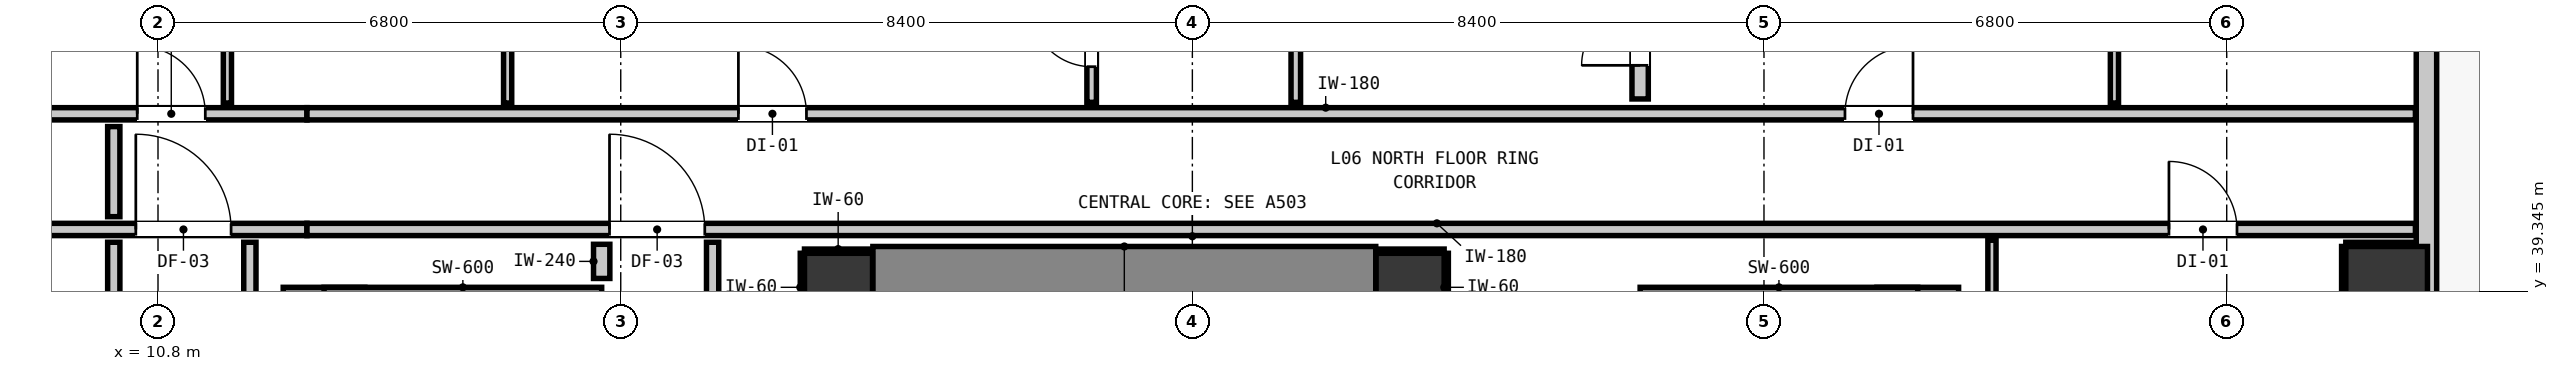
"""IFC4 building model, lengths in metres.
Left out: names, types, materials, properties, quantities, classifications, styles, units other than length and angle.
Written with IfcOpenShell. Run it as: python <this file> out.ifc"""

import sys

from ifc_helpers import new_model, si_unit, direction, frame, frame_2d, origin, origin_2d, place, context, subcontext, project, spatial, rectangle, extrude, element, fill, save


model = new_model("IFC4")
c1 = context("Model", 3, precision=1e-05, world=origin(), true_north=direction((0.0, 1.0)))
c2 = subcontext(c1, "Body", "Model", "MODEL_VIEW")
j1 = project(units=[si_unit("LENGTHUNIT", "METRE"), si_unit("PLANEANGLEUNIT", "RADIAN")], contexts=[c1])
p1 = place(None, origin())
s1 = spatial("IfcSite", under=j1, at=p1, CompositionType="ELEMENT")
p2 = place(p1, origin())
s2 = spatial("IfcBuilding", under=s1, at=p2, CompositionType="ELEMENT")
p3 = place(p2, frame((0.0, 0.0, 25.32)))
s3 = spatial("IfcBuildingStorey", under=s2, at=p3, CompositionType="ELEMENT", Elevation=25.32)
for number, where, z_axis, x_axis in (
    (1, (20.8, 39.4, 0.0), (0.0, 0.0, 1.0), (1.0, 0.0, 0.0)),
    (2, (29.2, 39.4, 0.0), (0.0, 0.0, 1.0), (1.0, 0.0, 0.0)),
):
    element("IfcColumn", number, at=place(p3, frame(where, z_axis=z_axis, x_axis=x_axis)), inside=s3, PredefinedType="COLUMN", context=c2, shape_type="SweptSolid", body=[
        extrude(rectangle(XDim=1.0, YDim=1.0, at=origin_2d()), origin(), (0.0, 0.0, 1.0), 3.32),
    ])
p4 = place(p3, frame((13.24, 31.205, 0.0), z_axis=(0.0, 0.0, 1.0), x_axis=(0.0, 1.0, 0.0)))
e3 = element("IfcWall", 3, at=p4, inside=s3, PredefinedType="SHEAR", context=c2, shape_type="SweptSolid", body=[
    extrude(rectangle(XDim=8.195, YDim=1.2, at=frame_2d((4.097, 0.0))), origin(), (0.0, 0.0, 1.0), 3.32),
])
p5 = place(p3, frame((13.24, 39.1, 0.0), z_axis=(0.0, 0.0, 1.0), x_axis=(1.0, 0.0, 0.0)))
e4 = element("IfcWall", 4, at=p5, inside=s3, PredefinedType="SHEAR", context=c2, shape_type="SweptSolid", body=[
    extrude(rectangle(XDim=4.08, YDim=0.6, at=frame_2d((2.04, 0.0))), origin(), (0.0, 0.0, 1.0), 3.32),
])
p6 = place(p3, frame((36.66, 31.205, 0.0), z_axis=(0.0, 0.0, 1.0), x_axis=(0.0, 1.0, 0.0)))
e5 = element("IfcWall", 5, at=p6, inside=s3, PredefinedType="SHEAR", context=c2, shape_type="SweptSolid", body=[
    extrude(rectangle(XDim=8.195, YDim=1.2, at=frame_2d((4.097, 0.0))), origin(), (0.0, 0.0, 1.0), 3.32),
])
p7 = place(p3, frame((32.58, 39.1, 0.0), z_axis=(0.0, 0.0, 1.0), x_axis=(1.0, 0.0, 0.0)))
e6 = element("IfcWall", 6, at=p7, inside=s3, PredefinedType="SHEAR", context=c2, shape_type="SweptSolid", body=[
    extrude(rectangle(XDim=4.08, YDim=0.6, at=frame_2d((2.04, 0.0))), origin(), (0.0, 0.0, 1.0), 3.32),
])
p8 = place(p3, frame((21.305, 39.4, 0.0), z_axis=(0.0, 0.0, 1.0), x_axis=(1.0, 0.0, 0.0)))
e7 = element("IfcWall", 7, at=p8, inside=s3, PredefinedType="SHEAR", context=c2, shape_type="SweptSolid", body=[
    extrude(rectangle(XDim=7.39, YDim=1.2, at=frame_2d((3.695, 0.0))), origin(), (0.0, 0.0, 1.0), 3.32),
])
p9 = place(p3, frame((43.55, 39.4, 0.0), z_axis=(0.0, 0.0, 1.0), x_axis=(1.0, 0.0, 0.0)))
e8 = element("IfcColumn", 8, at=p9, inside=s3, PredefinedType="COLUMN", context=c2, shape_type="SweptSolid", body=[
    extrude(rectangle(XDim=1.2, YDim=1.2, at=origin_2d()), origin(), (0.0, 0.0, 1.0), 3.32),
])
p10 = place(p3, frame((44.135, 44.835, 0.0), z_axis=(0.0, 0.0, 1.0), x_axis=(0.0, -1.0, 0.0)))
e9 = element("IfcWall", 9, at=p10, inside=s3, PredefinedType="STANDARD", context=c2, shape_type="SweptSolid", body=[
    extrude(rectangle(XDim=34.67, YDim=0.3, at=frame_2d((17.335, 0.0))), origin(), (0.0, 0.0, 1.0), 3.06),
])
p11 = place(p10, frame((0.901, 0.0, 0.0)))
e10 = element("IfcOpeningElement", 10, at=p11, cuts=e9, PredefinedType="OPENING", context=c2, shape_type="SweptSolid", body=[
    extrude(rectangle(XDim=1.0, YDim=2.15, at=frame_2d((0.5, 1.075))), frame((0.0, 0.16, 0.0), z_axis=(0.0, -1.0, 0.0), x_axis=(1.0, 0.0, 0.0)), (0.0, 0.0, 1.0), 0.32),
])
p12 = place(p10, frame((19.91, 0.0, 0.85)))
e11 = element("IfcOpeningElement", 11, at=p12, cuts=e9, PredefinedType="OPENING", context=c2, shape_type="SweptSolid", body=[
    extrude(rectangle(XDim=1.65, YDim=1.75, at=frame_2d((0.825, 0.875))), frame((0.0, 0.16, 0.0), z_axis=(0.0, -1.0, 0.0), x_axis=(1.0, 0.0, 0.0)), (0.0, 0.0, 1.0), 0.32),
])
p13 = place(p10, frame((7.126, 0.0, 0.85)))
e12 = element("IfcOpeningElement", 12, at=p13, cuts=e9, PredefinedType="OPENING", context=c2, shape_type="SweptSolid", body=[
    extrude(rectangle(XDim=1.65, YDim=1.75, at=frame_2d((0.825, 0.875))), frame((0.0, 0.16, 0.0), z_axis=(0.0, -1.0, 0.0), x_axis=(1.0, 0.0, 0.0)), (0.0, 0.0, 1.0), 0.32),
])
p14 = place(p3, frame((2.661, 40.25, 0.0), z_axis=(0.0, 0.0, 1.0), x_axis=(1.0, 0.0, 0.0)))
e13 = element("IfcWall", 13, at=p14, inside=s3, PredefinedType="PARTITIONING", context=c2, shape_type="SweptSolid", body=[
    extrude(rectangle(XDim=10.328, YDim=0.18, at=frame_2d((5.164, 0.0))), origin(), (0.0, 0.0, 1.0), 2.445),
])
p15 = place(p14, frame((7.813, 0.0, 0.0)))
e14 = element("IfcOpeningElement", 14, at=p15, cuts=e13, PredefinedType="OPENING", context=c2, shape_type="SweptSolid", body=[
    extrude(rectangle(XDim=1.4, YDim=2.15, at=frame_2d((0.7, 1.075))), frame((0.0, 0.1, 0.0), z_axis=(0.0, -1.0, 0.0), x_axis=(1.0, 0.0, 0.0)), (0.0, 0.0, 1.0), 0.2),
])
p16 = place(p3, frame((12.989, 40.25, 0.0), z_axis=(0.0, 0.0, 1.0), x_axis=(1.0, 0.0, 0.0)))
e15 = element("IfcWall", 15, at=p16, inside=s3, PredefinedType="PARTITIONING", context=c2, shape_type="SweptSolid", body=[
    extrude(rectangle(XDim=30.984, YDim=0.18, at=frame_2d((15.492, 0.0))), origin(), (0.0, 0.0, 1.0), 3.06),
])
p17 = place(p16, frame((4.446, 0.0, 0.0)))
e16 = element("IfcOpeningElement", 16, at=p17, cuts=e15, PredefinedType="OPENING", context=c2, shape_type="SweptSolid", body=[
    extrude(rectangle(XDim=1.4, YDim=2.15, at=frame_2d((0.7, 1.075))), frame((0.0, 0.1, 0.0), z_axis=(0.0, -1.0, 0.0), x_axis=(1.0, 0.0, 0.0)), (0.0, 0.0, 1.0), 0.2),
])
p18 = place(p16, frame((27.362, 0.0, 0.0)))
e17 = element("IfcOpeningElement", 17, at=p18, cuts=e15, PredefinedType="OPENING", context=c2, shape_type="SweptSolid", body=[
    extrude(rectangle(XDim=1.0, YDim=2.15, at=frame_2d((0.5, 1.075))), frame((0.0, 0.1, 0.0), z_axis=(0.0, -1.0, 0.0), x_axis=(1.0, 0.0, 0.0)), (0.0, 0.0, 1.0), 0.2),
])
p19 = place(p3, frame((2.661, 41.95, 0.0), z_axis=(0.0, 0.0, 1.0), x_axis=(1.0, 0.0, 0.0)))
e18 = element("IfcWall", 18, at=p19, inside=s3, PredefinedType="PARTITIONING", context=c2, shape_type="SweptSolid", body=[
    extrude(rectangle(XDim=10.328, YDim=0.18, at=frame_2d((5.164, 0.0))), origin(), (0.0, 0.0, 1.0), 2.445),
])
p20 = place(p19, frame((7.834, 0.0, 0.0)))
e19 = element("IfcOpeningElement", 19, at=p20, cuts=e18, PredefinedType="OPENING", context=c2, shape_type="SweptSolid", body=[
    extrude(rectangle(XDim=1.0, YDim=2.15, at=frame_2d((0.5, 1.075))), frame((0.0, 0.1, 0.0), z_axis=(0.0, -1.0, 0.0), x_axis=(1.0, 0.0, 0.0)), (0.0, 0.0, 1.0), 0.2),
])
p21 = place(p3, frame((12.989, 41.95, 0.0), z_axis=(0.0, 0.0, 1.0), x_axis=(1.0, 0.0, 0.0)))
e20 = element("IfcWall", 20, at=p21, inside=s3, PredefinedType="PARTITIONING", context=c2, shape_type="SweptSolid", body=[
    extrude(rectangle(XDim=30.984, YDim=0.18, at=frame_2d((15.492, 0.0))), origin(), (0.0, 0.0, 1.0), 3.06),
])
p22 = place(p21, frame((6.34, 0.0, 0.0)))
e21 = element("IfcOpeningElement", 21, at=p22, cuts=e20, PredefinedType="OPENING", context=c2, shape_type="SweptSolid", body=[
    extrude(rectangle(XDim=1.0, YDim=2.15, at=frame_2d((0.5, 1.075))), frame((0.0, 0.1, 0.0), z_axis=(0.0, -1.0, 0.0), x_axis=(1.0, 0.0, 0.0)), (0.0, 0.0, 1.0), 0.2),
])
p23 = place(p21, frame((22.601, 0.0, 0.0)))
e22 = element("IfcOpeningElement", 22, at=p23, cuts=e20, PredefinedType="OPENING", context=c2, shape_type="SweptSolid", body=[
    extrude(rectangle(XDim=1.0, YDim=2.15, at=frame_2d((0.5, 1.075))), frame((0.0, 0.1, 0.0), z_axis=(0.0, -1.0, 0.0), x_axis=(1.0, 0.0, 0.0)), (0.0, 0.0, 1.0), 0.2),
])
p24 = place(p3, frame((17.32, 39.53, 0.0), z_axis=(0.0, 0.0, 1.0), x_axis=(0.0, 1.0, 0.0)))
e23 = element("IfcWall", 23, at=p24, inside=s3, PredefinedType="PARTITIONING", context=c2, shape_type="SweptSolid", body=[
    extrude(rectangle(XDim=0.502, YDim=0.24, at=frame_2d((0.251, 0.0))), origin(), (0.0, 0.0, 1.0), 3.06),
])
p25 = place(p3, frame((32.58, 42.168, 0.0), z_axis=(0.0, 0.0, 1.0), x_axis=(0.0, 1.0, 0.0)))
e24 = element("IfcWall", 24, at=p25, inside=s3, PredefinedType="PARTITIONING", context=c2, shape_type="SweptSolid", body=[
    extrude(rectangle(XDim=1.842, YDim=0.24, at=frame_2d((0.921, 0.0))), origin(), (0.0, 0.0, 1.0), 3.06),
])
p26 = place(p25, frame((0.494, 0.0, 0.0)))
e25 = element("IfcOpeningElement", 25, at=p26, cuts=e24, PredefinedType="OPENING", context=c2, shape_type="SweptSolid", body=[
    extrude(rectangle(XDim=0.86, YDim=2.02, at=frame_2d((0.43, 1.01))), frame((0.0, 0.13, 0.0), z_axis=(0.0, -1.0, 0.0), x_axis=(1.0, 0.0, 0.0)), (0.0, 0.0, 1.0), 0.26),
])
p27 = place(p3, frame((10.15, 37.313, 0.0), z_axis=(0.0, 0.0, 1.0), x_axis=(0.0, 1.0, 0.0)))
e26 = element("IfcWall", 26, at=p27, inside=s3, PredefinedType="PARTITIONING", context=c2, shape_type="SweptSolid", body=[
    extrude(rectangle(XDim=2.749, YDim=0.18, at=frame_2d((1.375, 0.0))), origin(), (0.0, 0.0, 1.0), 3.06),
])
p28 = place(p3, frame((10.15, 40.438, 0.0), z_axis=(0.0, 0.0, 1.0), x_axis=(0.0, 1.0, 0.0)))
e27 = element("IfcWall", 27, at=p28, inside=s3, PredefinedType="PARTITIONING", context=c2, shape_type="SweptSolid", body=[
    extrude(rectangle(XDim=1.324, YDim=0.18, at=frame_2d((0.662, 0.0))), origin(), (0.0, 0.0, 1.0), 3.06),
])
p29 = place(p3, frame((12.15, 21.368, 0.0), z_axis=(0.0, 0.0, 1.0), x_axis=(0.0, 1.0, 0.0)))
e28 = element("IfcWall", 28, at=p29, inside=s3, PredefinedType="PARTITIONING", context=c2, shape_type="SweptSolid", body=[
    extrude(rectangle(XDim=18.694, YDim=0.18, at=frame_2d((9.347, 0.0))), origin(), (0.0, 0.0, 1.0), 3.06),
])
p30 = place(p3, frame((18.95, 38.918, 0.0), z_axis=(0.0, 0.0, 1.0), x_axis=(0.0, 1.0, 0.0)))
e29 = element("IfcWall", 29, at=p30, inside=s3, PredefinedType="PARTITIONING", context=c2, shape_type="SweptSolid", body=[
    extrude(rectangle(XDim=1.144, YDim=0.18, at=frame_2d((0.572, 0.0))), origin(), (0.0, 0.0, 1.0), 3.06),
])
p31 = place(p3, frame((24.52, 42.118, 0.0), z_axis=(0.0, 0.0, 1.0), x_axis=(0.0, 1.0, 0.0)))
e30 = element("IfcWall", 30, at=p31, inside=s3, PredefinedType="PARTITIONING", context=c2, shape_type="SweptSolid", body=[
    extrude(rectangle(XDim=1.942, YDim=0.14, at=frame_2d((0.971, 0.0))), origin(), (0.0, 0.0, 1.0), 3.06),
])
p32 = place(p31, frame((0.524, 0.0, 0.0)))
e31 = element("IfcOpeningElement", 31, at=p32, cuts=e30, PredefinedType="OPENING", context=c2, shape_type="SweptSolid", body=[
    extrude(rectangle(XDim=0.9, YDim=2.1, at=frame_2d((0.45, 1.05))), frame((0.0, 0.08, 0.0), z_axis=(0.0, -1.0, 0.0), x_axis=(1.0, 0.0, 0.0)), (0.0, 0.0, 1.0), 0.16),
])
p33 = place(p3, frame((27.52, 42.118, 0.0), z_axis=(0.0, 0.0, 1.0), x_axis=(0.0, 1.0, 0.0)))
e32 = element("IfcWall", 32, at=p33, inside=s3, PredefinedType="PARTITIONING", context=c2, shape_type="SweptSolid", body=[
    extrude(rectangle(XDim=1.942, YDim=0.14, at=frame_2d((0.971, 0.0))), origin(), (0.0, 0.0, 1.0), 3.06),
])
p34 = place(p3, frame((11.82, 42.108, 0.0), z_axis=(0.0, 0.0, 1.0), x_axis=(0.0, 1.0, 0.0)))
e33 = element("IfcWall", 33, at=p34, inside=s3, PredefinedType="PARTITIONING", context=c2, shape_type="SweptSolid", body=[
    extrude(rectangle(XDim=5.065, YDim=0.12, at=frame_2d((2.533, 0.0))), origin(), (0.0, 0.0, 1.0), 3.06),
])
p35 = place(p34, frame((2.017, 0.0, 0.0)))
e34 = element("IfcOpeningElement", 34, at=p35, cuts=e33, PredefinedType="OPENING", context=c2, shape_type="SweptSolid", body=[
    extrude(rectangle(XDim=0.9, YDim=2.1, at=frame_2d((0.45, 1.05))), frame((0.0, 0.07, 0.0), z_axis=(0.0, -1.0, 0.0), x_axis=(1.0, 0.0, 0.0)), (0.0, 0.0, 1.0), 0.14),
])
p36 = place(p3, frame((15.938, 42.108, 0.0), z_axis=(0.0, 0.0, 1.0), x_axis=(0.0, 1.0, 0.0)))
e35 = element("IfcWall", 35, at=p36, inside=s3, PredefinedType="PARTITIONING", context=c2, shape_type="SweptSolid", body=[
    extrude(rectangle(XDim=5.065, YDim=0.12, at=frame_2d((2.533, 0.0))), origin(), (0.0, 0.0, 1.0), 3.06),
])
p37 = place(p3, frame((37.75, 35.006, 0.0), z_axis=(0.0, 0.0, 1.0), x_axis=(0.0, 1.0, 0.0)))
e36 = element("IfcWall", 36, at=p37, inside=s3, PredefinedType="PARTITIONING", context=c2, shape_type="SweptSolid", body=[
    extrude(rectangle(XDim=5.086, YDim=0.12, at=frame_2d((2.543, 0.0))), origin(), (0.0, 0.0, 1.0), 3.06),
])
p38 = place(p3, frame((39.55, 42.108, 0.0), z_axis=(0.0, 0.0, 1.0), x_axis=(0.0, 1.0, 0.0)))
e37 = element("IfcWall", 37, at=p38, inside=s3, PredefinedType="PARTITIONING", context=c2, shape_type="SweptSolid", body=[
    extrude(rectangle(XDim=5.065, YDim=0.12, at=frame_2d((2.533, 0.0))), origin(), (0.0, 0.0, 1.0), 3.06),
])
p39 = place(p38, frame((2.017, 0.0, 0.0)))
e38 = element("IfcOpeningElement", 38, at=p39, cuts=e37, PredefinedType="OPENING", context=c2, shape_type="SweptSolid", body=[
    extrude(rectangle(XDim=0.9, YDim=2.1, at=frame_2d((0.45, 1.05))), frame((0.0, 0.07, 0.0), z_axis=(0.0, -1.0, 0.0), x_axis=(1.0, 0.0, 0.0)), (0.0, 0.0, 1.0), 0.14),
])
p40 = place(p3, frame((20.3, 39.932, 0.0), z_axis=(0.0, 0.0, 1.0), x_axis=(1.0, 0.0, 0.0)))
e39 = element("IfcWall", 39, at=p40, inside=s3, PredefinedType="PARTITIONING", context=c2, shape_type="SweptSolid", body=[
    extrude(rectangle(XDim=0.99, YDim=0.06, at=frame_2d((0.495, 0.0))), origin(), (0.0, 0.0, 1.0), 1.45),
])
p41 = place(p3, frame((20.268, 38.9, 0.0), z_axis=(0.0, 0.0, 1.0), x_axis=(0.0, 1.0, 0.0)))
e40 = element("IfcWall", 40, at=p41, inside=s3, PredefinedType="PARTITIONING", context=c2, shape_type="SweptSolid", body=[
    extrude(rectangle(XDim=1.0, YDim=0.06, at=frame_2d((0.5, 0.0))), origin(), (0.0, 0.0, 1.0), 1.45),
])
p42 = place(p3, frame((28.71, 39.932, 0.0), z_axis=(0.0, 0.0, 1.0), x_axis=(1.0, 0.0, 0.0)))
e41 = element("IfcWall", 41, at=p42, inside=s3, PredefinedType="PARTITIONING", context=c2, shape_type="SweptSolid", body=[
    extrude(rectangle(XDim=0.99, YDim=0.06, at=frame_2d((0.495, 0.0))), origin(), (0.0, 0.0, 1.0), 1.45),
])
p43 = place(p3, frame((29.732, 38.9, 0.0), z_axis=(0.0, 0.0, 1.0), x_axis=(0.0, 1.0, 0.0)))
e42 = element("IfcWall", 42, at=p43, inside=s3, PredefinedType="PARTITIONING", context=c2, shape_type="SweptSolid", body=[
    extrude(rectangle(XDim=1.0, YDim=0.06, at=frame_2d((0.5, 0.0))), origin(), (0.0, 0.0, 1.0), 1.45),
])
p44 = place(p3, frame((42.95, 40.032, 0.0), z_axis=(0.0, 0.0, 1.0), x_axis=(1.0, 0.0, 0.0)))
e43 = element("IfcWall", 43, at=p44, inside=s3, PredefinedType="PARTITIONING", context=c2, shape_type="SweptSolid", body=[
    extrude(rectangle(XDim=1.02, YDim=0.06, at=frame_2d((0.51, 0.0))), origin(), (0.0, 0.0, 1.0), 1.45),
])
p45 = place(p3, frame((42.918, 38.8, 0.0), z_axis=(0.0, 0.0, 1.0), x_axis=(0.0, 1.0, 0.0)))
e44 = element("IfcWall", 44, at=p45, inside=s3, PredefinedType="PARTITIONING", context=c2, shape_type="SweptSolid", body=[
    extrude(rectangle(XDim=1.2, YDim=0.06, at=frame_2d((0.6, 0.0))), origin(), (0.0, 0.0, 1.0), 1.45),
])
p46 = place(p17, origin())
e45 = element("IfcDoor", 45, at=p46, inside=s3, OperationType="SINGLE_SWING_LEFT", PredefinedType="DOOR", context=c2, shape_type="SweptSolid", body=[
    extrude(rectangle(XDim=1.4, YDim=2.15, at=frame_2d((0.7, 1.075))), frame((0.0, 0.025, 0.0), z_axis=(0.0, -1.0, 0.0), x_axis=(1.0, 0.0, 0.0)), (0.0, 0.0, 1.0), 0.05),
])
fill(e16, e45)
p47 = place(p15, origin())
e46 = element("IfcDoor", 46, at=p47, inside=s3, OperationType="SINGLE_SWING_LEFT", PredefinedType="DOOR", context=c2, shape_type="SweptSolid", body=[
    extrude(rectangle(XDim=1.4, YDim=2.15, at=frame_2d((0.7, 1.075))), frame((0.0, 0.025, 0.0), z_axis=(0.0, -1.0, 0.0), x_axis=(1.0, 0.0, 0.0)), (0.0, 0.0, 1.0), 0.05),
])
fill(e14, e46)
p48 = place(p20, origin())
e47 = element("IfcDoor", 47, at=p48, inside=s3, OperationType="SINGLE_SWING_LEFT", PredefinedType="DOOR", context=c2, shape_type="SweptSolid", body=[
    extrude(rectangle(XDim=1.0, YDim=2.15, at=frame_2d((0.5, 1.075))), frame((0.0, 0.025, 0.0), z_axis=(0.0, -1.0, 0.0), x_axis=(1.0, 0.0, 0.0)), (0.0, 0.0, 1.0), 0.05),
])
fill(e19, e47)
p49 = place(p22, origin())
e48 = element("IfcDoor", 48, at=p49, inside=s3, OperationType="SINGLE_SWING_LEFT", PredefinedType="DOOR", context=c2, shape_type="SweptSolid", body=[
    extrude(rectangle(XDim=1.0, YDim=2.15, at=frame_2d((0.5, 1.075))), frame((0.0, 0.025, 0.0), z_axis=(0.0, -1.0, 0.0), x_axis=(1.0, 0.0, 0.0)), (0.0, 0.0, 1.0), 0.05),
])
fill(e21, e48)
p50 = place(p32, origin())
e49 = element("IfcDoor", 49, at=p50, inside=s3, OperationType="SINGLE_SWING_RIGHT", PredefinedType="DOOR", context=c2, shape_type="SweptSolid", body=[
    extrude(rectangle(XDim=0.9, YDim=2.1, at=frame_2d((0.45, 1.05))), frame((0.0, 0.025, 0.0), z_axis=(0.0, -1.0, 0.0), x_axis=(1.0, 0.0, 0.0)), (0.0, 0.0, 1.0), 0.05),
])
fill(e31, e49)
p51 = place(p23, origin())
e50 = element("IfcDoor", 50, at=p51, inside=s3, OperationType="SINGLE_SWING_RIGHT", PredefinedType="DOOR", context=c2, shape_type="SweptSolid", body=[
    extrude(rectangle(XDim=1.0, YDim=2.15, at=frame_2d((0.5, 1.075))), frame((0.0, 0.025, 0.0), z_axis=(0.0, -1.0, 0.0), x_axis=(1.0, 0.0, 0.0)), (0.0, 0.0, 1.0), 0.05),
])
fill(e22, e50)
p52 = place(p26, origin())
e51 = element("IfcDoor", 51, at=p52, inside=s3, OperationType="SINGLE_SWING_LEFT", PredefinedType="DOOR", context=c2, shape_type="SweptSolid", body=[
    extrude(rectangle(XDim=0.86, YDim=2.02, at=frame_2d((0.43, 1.01))), frame((0.0, 0.025, 0.0), z_axis=(0.0, -1.0, 0.0), x_axis=(1.0, 0.0, 0.0)), (0.0, 0.0, 1.0), 0.05),
])
fill(e25, e51)
p53 = place(p18, origin())
e52 = element("IfcDoor", 52, at=p53, inside=s3, OperationType="SINGLE_SWING_LEFT", PredefinedType="DOOR", context=c2, shape_type="SweptSolid", body=[
    extrude(rectangle(XDim=1.0, YDim=2.15, at=frame_2d((0.5, 1.075))), frame((0.0, 0.025, 0.0), z_axis=(0.0, -1.0, 0.0), x_axis=(1.0, 0.0, 0.0)), (0.0, 0.0, 1.0), 0.05),
])
fill(e17, e52)
save(model, sys.argv[1])
